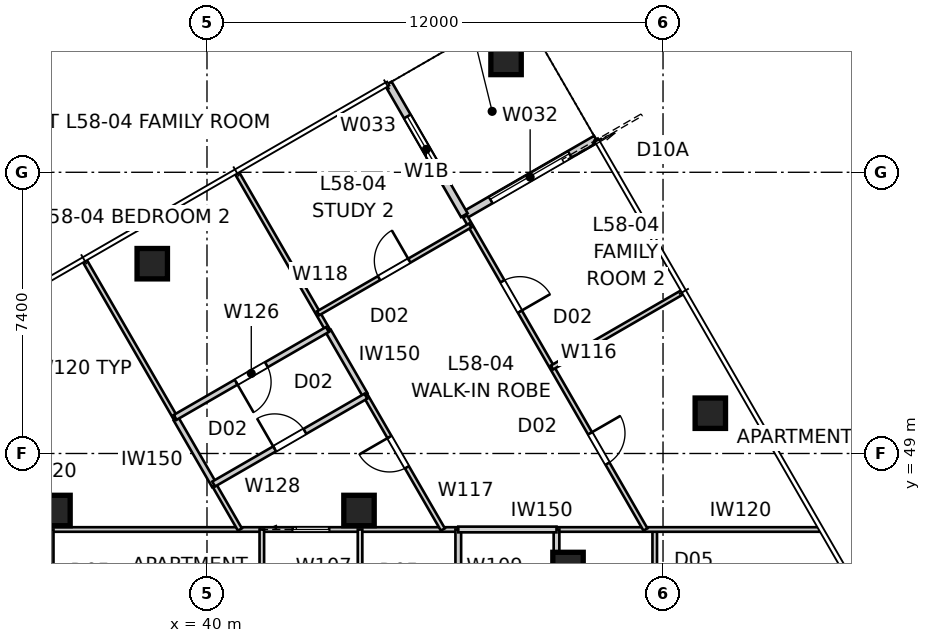
"""IFC4 building model, lengths in metres.
Left out: names, types, materials, properties, quantities, classifications, styles, units other than length and angle.
Written with IfcOpenShell. Run it as: python <this file> out.ifc"""

import sys

from ifc_helpers import new_model, si_unit, direction, frame, frame_2d, origin, origin_2d, place, context, subcontext, project, spatial, rectangle, extrude, element, fill, save


model = new_model("IFC4")
c1 = context("Model", 3, precision=1e-05, world=origin(), true_north=direction((0.0, 1.0)))
c2 = subcontext(c1, "Body", "Model", "MODEL_VIEW")
j1 = project(units=[si_unit("LENGTHUNIT", "METRE"), si_unit("PLANEANGLEUNIT", "RADIAN")], contexts=[c1])
p1 = place(None, origin())
s1 = spatial("IfcSite", under=j1, at=p1, CompositionType="ELEMENT")
p2 = place(p1, origin())
s2 = spatial("IfcBuilding", under=s1, at=p2, CompositionType="ELEMENT")
p3 = place(p2, frame((0.0, 0.0, 211.6)))
s3 = spatial("IfcBuildingStorey", under=s2, at=p3, CompositionType="ELEMENT", Elevation=211.6)
for number, where, z_axis, x_axis in (
    (1, (53.245, 50.06, 0.0), (0.0, 0.0, 1.0), (1.0, 0.0, 0.0)),
    (2, (47.87, 59.37, 0.0), (0.0, 0.0, 1.0), (1.0, 0.0, 0.0)),
    (3, (38.56, 53.995, 0.0), (0.0, 0.0, 1.0), (1.0, 0.0, 0.0)),
    (4, (49.5, 46.0, 0.0), (0.0, 0.0, 1.0), (1.0, 0.0, 0.0)),
    (5, (44.0, 47.5, 0.0), (0.0, 0.0, 1.0), (1.0, 0.0, 0.0)),
    (6, (36.0, 47.5, 0.0), (0.0, 0.0, 1.0), (1.0, 0.0, 0.0)),
):
    element("IfcColumn", number, at=place(p3, frame(where, z_axis=z_axis, x_axis=x_axis)), inside=s3, PredefinedType="COLUMN", context=c2, shape_type="SweptSolid", body=[
        extrude(rectangle(XDim=0.8, YDim=0.8, at=origin_2d()), origin(), (0.0, 0.0, 1.0), 3.4),
    ])
p4 = place(p3, frame((50.236, 57.271, 0.0), z_axis=(0.0, 0.0, 1.0), x_axis=(-0.866026010844, -0.49999894854, 0.0)))
e7 = element("IfcWall", 7, at=p4, inside=s3, PredefinedType="SOLIDWALL", context=c2, shape_type="SweptSolid", body=[
    extrude(rectangle(XDim=4.0, YDim=0.2, at=frame_2d((2.0, 0.0))), origin(), (0.0, 0.0, 1.0), 3.25),
])
p5 = place(p4, frame((0.8, 0.0, 0.0)))
e8 = element("IfcOpeningElement", 8, at=p5, cuts=e7, PredefinedType="OPENING", context=c2, shape_type="SweptSolid", body=[
    extrude(rectangle(XDim=2.4, YDim=2.1, at=frame_2d((1.2, 1.05))), frame((0.0, 0.11, 0.0), z_axis=(0.0, -1.0, 0.0), x_axis=(1.0, 0.0, 0.0)), (0.0, 0.0, 1.0), 0.22),
])
p6 = place(p3, frame((46.771, 55.271, 0.0), z_axis=(0.0, 0.0, 1.0), x_axis=(-0.49999894854, 0.866026010844, 0.0)))
e9 = element("IfcWall", 9, at=p6, inside=s3, PredefinedType="SOLIDWALL", context=c2, shape_type="SweptSolid", body=[
    extrude(rectangle(XDim=4.0, YDim=0.2, at=frame_2d((2.0, 0.0))), origin(), (0.0, 0.0, 1.0), 3.25),
])
p7 = place(p6, frame((1.0, 0.0, 0.45)))
e10 = element("IfcOpeningElement", 10, at=p7, cuts=e9, PredefinedType="OPENING", context=c2, shape_type="SweptSolid", body=[
    extrude(rectangle(XDim=2.0, YDim=1.8, at=frame_2d((1.0, 0.9))), frame((0.0, 0.11, 0.0), z_axis=(0.0, -1.0, 0.0), x_axis=(1.0, 0.0, 0.0)), (0.0, 0.0, 1.0), 0.22),
])
p8 = place(p3, frame((24.525, 47.0, 0.0), z_axis=(0.0, 0.0, 1.0), x_axis=(1.0, 0.0, 0.0)))
e11 = element("IfcWall", 11, at=p8, inside=s3, PredefinedType="PARTITIONING", context=c2, shape_type="SweptSolid", body=[
    extrude(rectangle(XDim=22.087, YDim=0.12, at=frame_2d((11.044, 0.0))), origin(), (0.0, 0.0, 1.0), 2.55),
])
p9 = place(p8, frame((1.928, 0.0, 0.0)))
e12 = element("IfcOpeningElement", 12, at=p9, cuts=e11, PredefinedType="OPENING", context=c2, shape_type="SweptSolid", body=[
    extrude(rectangle(XDim=0.92, YDim=2.34, at=frame_2d((0.46, 1.17))), frame((0.0, 0.07, 0.0), z_axis=(0.0, -1.0, 0.0), x_axis=(1.0, 0.0, 0.0)), (0.0, 0.0, 1.0), 0.14),
])
p10 = place(p8, frame((17.73, 0.0, 0.0)))
e13 = element("IfcOpeningElement", 13, at=p10, cuts=e11, PredefinedType="OPENING", context=c2, shape_type="SweptSolid", body=[
    extrude(rectangle(XDim=0.96, YDim=2.1, at=frame_2d((0.48, 1.05))), frame((0.0, 0.07, 0.0), z_axis=(0.0, -1.0, 0.0), x_axis=(1.0, 0.0, 0.0)), (0.0, 0.0, 1.0), 0.14),
])
p11 = place(p3, frame((35.901, 47.0, 0.0), z_axis=(0.0, 0.0, 1.0), x_axis=(0.0, -1.0, 0.0)))
e14 = element("IfcWall", 14, at=p11, inside=s3, PredefinedType="PARTITIONING", context=c2, shape_type="SweptSolid", body=[
    extrude(rectangle(XDim=4.9, YDim=0.12, at=frame_2d((2.45, 0.0))), origin(), (0.0, 0.0, 1.0), 3.25),
])
p12 = place(p11, frame((1.97, 0.0, 0.0)))
e15 = element("IfcOpeningElement", 15, at=p12, cuts=e14, PredefinedType="OPENING", context=c2, shape_type="SweptSolid", body=[
    extrude(rectangle(XDim=0.96, YDim=2.1, at=frame_2d((0.48, 1.05))), frame((0.0, 0.07, 0.0), z_axis=(0.0, -1.0, 0.0), x_axis=(1.0, 0.0, 0.0)), (0.0, 0.0, 1.0), 0.14),
])
p13 = place(p3, frame((51.782, 41.18, 0.0), z_axis=(0.0, 0.0, 1.0), x_axis=(0.0, 1.0, 0.0)))
e16 = element("IfcWall", 16, at=p13, inside=s3, PredefinedType="PARTITIONING", context=c2, shape_type="SweptSolid", body=[
    extrude(rectangle(XDim=5.82, YDim=0.12, at=frame_2d((2.91, 0.0))), origin(), (0.0, 0.0, 1.0), 3.25),
])
p14 = place(p13, frame((3.178, 0.0, 0.0)))
e17 = element("IfcOpeningElement", 17, at=p14, cuts=e16, PredefinedType="OPENING", context=c2, shape_type="SweptSolid", body=[
    extrude(rectangle(XDim=0.96, YDim=2.1, at=frame_2d((0.48, 1.05))), frame((0.0, 0.07, 0.0), z_axis=(0.0, -1.0, 0.0), x_axis=(1.0, 0.0, 0.0)), (0.0, 0.0, 1.0), 0.14),
])
p15 = place(p3, frame((49.197, 47.0, 0.0), z_axis=(0.0, 0.0, 1.0), x_axis=(1.0, 0.0, 0.0)))
e18 = element("IfcWall", 18, at=p15, inside=s3, PredefinedType="PARTITIONING", context=c2, shape_type="SweptSolid", body=[
    extrude(rectangle(XDim=6.923, YDim=0.12, at=frame_2d((3.461, 0.0))), origin(), (0.0, 0.0, 1.0), 3.25),
])
p16 = place(p3, frame((44.028, 47.0, 0.0), z_axis=(0.0, 0.0, 1.0), x_axis=(0.0, -1.0, 0.0)))
e19 = element("IfcWall", 19, at=p16, inside=s3, PredefinedType="PARTITIONING", context=c2, shape_type="SweptSolid", body=[
    extrude(rectangle(XDim=4.9, YDim=0.12, at=frame_2d((2.45, 0.0))), origin(), (0.0, 0.0, 1.0), 3.25),
])
p17 = place(p16, frame((1.97, 0.0, 0.0)))
e20 = element("IfcOpeningElement", 20, at=p17, cuts=e19, PredefinedType="OPENING", context=c2, shape_type="SweptSolid", body=[
    extrude(rectangle(XDim=0.96, YDim=2.1, at=frame_2d((0.48, 1.05))), frame((0.0, 0.07, 0.0), z_axis=(0.0, -1.0, 0.0), x_axis=(1.0, 0.0, 0.0)), (0.0, 0.0, 1.0), 0.14),
])
p18 = place(p3, frame((41.443, 42.1, 0.0), z_axis=(0.0, 0.0, 1.0), x_axis=(0.0, 1.0, 0.0)))
e21 = element("IfcWall", 21, at=p18, inside=s3, PredefinedType="PARTITIONING", context=c2, shape_type="SweptSolid", body=[
    extrude(rectangle(XDim=4.9, YDim=0.12, at=frame_2d((2.45, 0.0))), origin(), (0.0, 0.0, 1.0), 3.25),
])
p19 = place(p18, frame((1.97, 0.0, 0.0)))
e22 = element("IfcOpeningElement", 22, at=p19, cuts=e21, PredefinedType="OPENING", context=c2, shape_type="SweptSolid", body=[
    extrude(rectangle(XDim=0.96, YDim=2.1, at=frame_2d((0.48, 1.05))), frame((0.0, 0.07, 0.0), z_axis=(0.0, -1.0, 0.0), x_axis=(1.0, 0.0, 0.0)), (0.0, 0.0, 1.0), 0.14),
])
p20 = place(p3, frame((46.612, 47.0, 0.0), z_axis=(0.0, 0.0, 1.0), x_axis=(0.0, -1.0, 0.0)))
e23 = element("IfcWall", 23, at=p20, inside=s3, PredefinedType="SOLIDWALL", context=c2, shape_type="SweptSolid", body=[
    extrude(rectangle(XDim=4.9, YDim=0.15, at=frame_2d((2.45, 0.0))), origin(), (0.0, 0.0, 1.0), 3.25),
])
p21 = place(p20, frame((1.99, 0.0, 0.0)))
e24 = element("IfcOpeningElement", 24, at=p21, cuts=e23, PredefinedType="OPENING", context=c2, shape_type="SweptSolid", body=[
    extrude(rectangle(XDim=0.92, YDim=2.34, at=frame_2d((0.46, 1.17))), frame((0.0, 0.085, 0.0), z_axis=(0.0, -1.0, 0.0), x_axis=(1.0, 0.0, 0.0)), (0.0, 0.0, 1.0), 0.17),
])
p22 = place(p3, frame((49.197, 42.1, 0.0), z_axis=(0.0, 0.0, 1.0), x_axis=(0.0, 1.0, 0.0)))
e25 = element("IfcWall", 25, at=p22, inside=s3, PredefinedType="SOLIDWALL", context=c2, shape_type="SweptSolid", body=[
    extrude(rectangle(XDim=4.9, YDim=0.15, at=frame_2d((2.45, 0.0))), origin(), (0.0, 0.0, 1.0), 3.25),
])
p23 = place(p22, frame((1.97, 0.0, 0.0)))
e26 = element("IfcOpeningElement", 26, at=p23, cuts=e25, PredefinedType="OPENING", context=c2, shape_type="SweptSolid", body=[
    extrude(rectangle(XDim=0.96, YDim=2.1, at=frame_2d((0.48, 1.05))), frame((0.0, 0.085, 0.0), z_axis=(0.0, -1.0, 0.0), x_axis=(1.0, 0.0, 0.0)), (0.0, 0.0, 1.0), 0.17),
])
p24 = place(p3, frame((46.612, 47.0, 0.0), z_axis=(0.0, 0.0, 1.0), x_axis=(1.0, 0.0, 0.0)))
e27 = element("IfcWall", 27, at=p24, inside=s3, PredefinedType="SOLIDWALL", context=c2, shape_type="SweptSolid", body=[
    extrude(rectangle(XDim=2.585, YDim=0.15, at=frame_2d((1.292, 0.0))), origin(), (0.0, 0.0, 1.0), 3.25),
])
p25 = place(p3, frame((43.193, 52.219, 0.0), z_axis=(0.0, 0.0, 1.0), x_axis=(-0.50000634465, 0.866021740668, 0.0)))
e28 = element("IfcWall", 28, at=p25, inside=s3, PredefinedType="PARTITIONING", context=c2, shape_type="SweptSolid", body=[
    extrude(rectangle(XDim=4.814, YDim=0.12, at=frame_2d((2.407, 0.0))), origin(), (0.0, 0.0, 1.0), 3.25),
])
p26 = place(p3, frame((46.792, 55.237, 0.0), z_axis=(0.0, 0.0, 1.0), x_axis=(0.49923620881, -0.866465929978, 0.0)))
e29 = element("IfcWall", 29, at=p26, inside=s3, PredefinedType="PARTITIONING", context=c2, shape_type="SweptSolid", body=[
    extrude(rectangle(XDim=9.506, YDim=0.12, at=frame_2d((4.753, 0.0))), origin(), (0.0, 0.0, 1.0), 3.25),
])
p27 = place(p26, frame((6.586, 0.0, 0.0)))
e30 = element("IfcOpeningElement", 30, at=p27, cuts=e29, PredefinedType="OPENING", context=c2, shape_type="SweptSolid", body=[
    extrude(rectangle(XDim=0.92, YDim=2.34, at=frame_2d((0.46, 1.17))), frame((0.0, 0.07, 0.0), z_axis=(0.0, -1.0, 0.0), x_axis=(1.0, 0.0, 0.0)), (0.0, 0.0, 1.0), 0.14),
])
p28 = place(p26, frame((1.969, 0.0, 0.0)))
e31 = element("IfcOpeningElement", 31, at=p28, cuts=e29, PredefinedType="OPENING", context=c2, shape_type="SweptSolid", body=[
    extrude(rectangle(XDim=0.92, YDim=2.34, at=frame_2d((0.46, 1.17))), frame((0.0, 0.07, 0.0), z_axis=(0.0, -1.0, 0.0), x_axis=(1.0, 0.0, 0.0)), (0.0, 0.0, 1.0), 0.14),
])
p29 = place(p3, frame((46.207, 47.0, 0.0), z_axis=(0.0, 0.0, 1.0), x_axis=(-0.499986975689, 0.866032923243, 0.0)))
e32 = element("IfcWall", 32, at=p29, inside=s3, PredefinedType="PARTITIONING", context=c2, shape_type="SweptSolid", body=[
    extrude(rectangle(XDim=4.101, YDim=0.12, at=frame_2d((2.051, 0.0))), origin(), (0.0, 0.0, 1.0), 3.25),
])
p30 = place(p29, frame((1.891, 0.0, 0.0)))
e33 = element("IfcOpeningElement", 33, at=p30, cuts=e32, PredefinedType="OPENING", context=c2, shape_type="SweptSolid", body=[
    extrude(rectangle(XDim=0.92, YDim=2.34, at=frame_2d((0.46, 1.17))), frame((0.0, 0.07, 0.0), z_axis=(0.0, -1.0, 0.0), x_axis=(1.0, 0.0, 0.0)), (0.0, 0.0, 1.0), 0.14),
])
p31 = place(p3, frame((42.922, 52.688, 0.0), z_axis=(0.0, 0.0, 1.0), x_axis=(0.866025598446, 0.499999662836, 0.0)))
e34 = element("IfcWall", 34, at=p31, inside=s3, PredefinedType="PARTITIONING", context=c2, shape_type="SweptSolid", body=[
    extrude(rectangle(XDim=4.625, YDim=0.12, at=frame_2d((2.312, 0.0))), origin(), (0.0, 0.0, 1.0), 3.25),
])
p32 = place(p31, frame((1.853, 0.0, 0.0)))
e35 = element("IfcOpeningElement", 35, at=p32, cuts=e34, PredefinedType="OPENING", context=c2, shape_type="SweptSolid", body=[
    extrude(rectangle(XDim=0.92, YDim=2.34, at=frame_2d((0.46, 1.17))), frame((0.0, 0.07, 0.0), z_axis=(0.0, -1.0, 0.0), x_axis=(1.0, 0.0, 0.0)), (0.0, 0.0, 1.0), 0.14),
])
p33 = place(p3, frame((44.156, 50.552, 0.0), z_axis=(0.0, 0.0, 1.0), x_axis=(-0.50001143954, 0.866018799062, 0.0)))
e36 = element("IfcWall", 36, at=p33, inside=s3, PredefinedType="SOLIDWALL", context=c2, shape_type="SweptSolid", body=[
    extrude(rectangle(XDim=1.926, YDim=0.15, at=frame_2d((0.963, 0.0))), origin(), (0.0, 0.0, 1.0), 3.25),
])
p34 = place(p3, frame((36.781, 54.076, 0.0), z_axis=(0.0, 0.0, 1.0), x_axis=(0.50000634465, -0.866021740668, 0.0)))
e37 = element("IfcWall", 37, at=p34, inside=s3, PredefinedType="PARTITIONING", context=c2, shape_type="SweptSolid", body=[
    extrude(rectangle(XDim=4.814, YDim=0.12, at=frame_2d((2.407, 0.0))), origin(), (0.0, 0.0, 1.0), 3.25),
])
p35 = place(p3, frame((40.2, 48.153, 0.0), z_axis=(0.0, 0.0, 1.0), x_axis=(0.500045314201, -0.865999240038, 0.0)))
e38 = element("IfcWall", 38, at=p35, inside=s3, PredefinedType="PARTITIONING", context=c2, shape_type="SweptSolid", body=[
    extrude(rectangle(XDim=1.331, YDim=0.12, at=frame_2d((0.666, 0.0))), origin(), (0.0, 0.0, 1.0), 3.25),
])
p36 = place(p3, frame((39.188, 49.907, 0.0), z_axis=(0.0, 0.0, 1.0), x_axis=(0.499924156672, -0.866069187523, 0.0)))
e39 = element("IfcWall", 39, at=p36, inside=s3, PredefinedType="SOLIDWALL", context=c2, shape_type="SweptSolid", body=[
    extrude(rectangle(XDim=2.026, YDim=0.15, at=frame_2d((1.013, 0.0))), origin(), (0.0, 0.0, 1.0), 3.25),
])
p37 = place(p3, frame((43.168, 52.263, 0.0), z_axis=(0.0, 0.0, 1.0), x_axis=(-0.866025598446, -0.499999662836, 0.0)))
e40 = element("IfcWall", 40, at=p37, inside=s3, PredefinedType="SOLIDWALL", context=c2, shape_type="SweptSolid", body=[
    extrude(rectangle(XDim=4.625, YDim=0.15, at=frame_2d((2.312, 0.0))), origin(), (0.0, 0.0, 1.0), 3.25),
])
p38 = place(p37, frame((1.853, 0.0, 0.0)))
e41 = element("IfcOpeningElement", 41, at=p38, cuts=e40, PredefinedType="OPENING", context=c2, shape_type="SweptSolid", body=[
    extrude(rectangle(XDim=0.92, YDim=2.34, at=frame_2d((0.46, 1.17))), frame((0.0, 0.085, 0.0), z_axis=(0.0, -1.0, 0.0), x_axis=(1.0, 0.0, 0.0)), (0.0, 0.0, 1.0), 0.17),
])
p39 = place(p3, frame((49.077, 51.262, 0.0), z_axis=(0.0, 0.0, 1.0), x_axis=(0.865992964694, 0.500056181943, 0.0)))
e42 = element("IfcWall", 42, at=p39, inside=s3, PredefinedType="PARTITIONING", context=c2, shape_type="SweptSolid", body=[
    extrude(rectangle(XDim=3.968, YDim=0.12, at=frame_2d((1.984, 0.0))), origin(), (0.0, 0.0, 1.0), 3.25),
])
p40 = place(p3, frame((40.176, 48.196, 0.0), z_axis=(0.0, 0.0, 1.0), x_axis=(0.866025598446, 0.499999662836, 0.0)))
e43 = element("IfcWall", 43, at=p40, inside=s3, PredefinedType="SOLIDWALL", context=c2, shape_type="SweptSolid", body=[
    extrude(rectangle(XDim=4.625, YDim=0.15, at=frame_2d((2.312, 0.0))), origin(), (0.0, 0.0, 1.0), 3.25),
])
p41 = place(p40, frame((1.853, 0.0, 0.0)))
e44 = element("IfcOpeningElement", 44, at=p41, cuts=e43, PredefinedType="OPENING", context=c2, shape_type="SweptSolid", body=[
    extrude(rectangle(XDim=0.92, YDim=2.34, at=frame_2d((0.46, 1.17))), frame((0.0, 0.085, 0.0), z_axis=(0.0, -1.0, 0.0), x_axis=(1.0, 0.0, 0.0)), (0.0, 0.0, 1.0), 0.17),
])
p42 = place(p5, origin())
e45 = element("IfcDoor", 45, at=p42, inside=s3, OperationType="SLIDING_TO_LEFT", PredefinedType="DOOR", context=c2, shape_type="SweptSolid", body=[
    extrude(rectangle(XDim=2.4, YDim=2.1, at=frame_2d((1.2, 1.05))), frame((0.0, 0.025, 0.0), z_axis=(0.0, -1.0, 0.0), x_axis=(1.0, 0.0, 0.0)), (0.0, 0.0, 1.0), 0.05),
])
fill(e8, e45)
p43 = place(p7, origin())
e46 = element("IfcWindow", 46, at=p43, inside=s3, PartitioningType="SINGLE_PANEL", PredefinedType="WINDOW", context=c2, shape_type="SweptSolid", body=[
    extrude(rectangle(XDim=2.0, YDim=1.8, at=frame_2d((1.0, 0.9))), frame((0.0, 0.03, 0.0), z_axis=(0.0, -1.0, 0.0), x_axis=(1.0, 0.0, 0.0)), (0.0, 0.0, 1.0), 0.06),
])
fill(e10, e46)
p44 = place(p10, origin())
e47 = element("IfcDoor", 47, at=p44, inside=s3, OperationType="SLIDING_TO_LEFT", PredefinedType="DOOR", context=c2, shape_type="SweptSolid", body=[
    extrude(rectangle(XDim=0.96, YDim=2.1, at=frame_2d((0.48, 1.05))), frame((0.0, 0.025, 0.0), z_axis=(0.0, -1.0, 0.0), x_axis=(1.0, 0.0, 0.0)), (0.0, 0.0, 1.0), 0.05),
])
fill(e13, e47)
p45 = place(p41, origin())
e48 = element("IfcDoor", 48, at=p45, inside=s3, OperationType="SINGLE_SWING_LEFT", PredefinedType="DOOR", context=c2, shape_type="SweptSolid", body=[
    extrude(rectangle(XDim=0.92, YDim=2.34, at=frame_2d((0.46, 1.17))), frame((0.0, 0.025, 0.0), z_axis=(0.0, -1.0, 0.0), x_axis=(1.0, 0.0, 0.0)), (0.0, 0.0, 1.0), 0.05),
])
fill(e44, e48)
p46 = place(p30, origin())
e49 = element("IfcDoor", 49, at=p46, inside=s3, OperationType="SINGLE_SWING_RIGHT", PredefinedType="DOOR", context=c2, shape_type="SweptSolid", body=[
    extrude(rectangle(XDim=0.92, YDim=2.34, at=frame_2d((0.46, 1.17))), frame((0.0, 0.025, 0.0), z_axis=(0.0, -1.0, 0.0), x_axis=(1.0, 0.0, 0.0)), (0.0, 0.0, 1.0), 0.05),
])
fill(e33, e49)
p47 = place(p38, origin())
e50 = element("IfcDoor", 50, at=p47, inside=s3, OperationType="SINGLE_SWING_RIGHT", PredefinedType="DOOR", context=c2, shape_type="SweptSolid", body=[
    extrude(rectangle(XDim=0.92, YDim=2.34, at=frame_2d((0.46, 1.17))), frame((0.0, 0.025, 0.0), z_axis=(0.0, -1.0, 0.0), x_axis=(1.0, 0.0, 0.0)), (0.0, 0.0, 1.0), 0.05),
])
fill(e41, e50)
p48 = place(p27, origin())
e51 = element("IfcDoor", 51, at=p48, inside=s3, OperationType="SINGLE_SWING_LEFT", PredefinedType="DOOR", context=c2, shape_type="SweptSolid", body=[
    extrude(rectangle(XDim=0.92, YDim=2.34, at=frame_2d((0.46, 1.17))), frame((0.0, 0.025, 0.0), z_axis=(0.0, -1.0, 0.0), x_axis=(1.0, 0.0, 0.0)), (0.0, 0.0, 1.0), 0.05),
])
fill(e30, e51)
p49 = place(p32, origin())
e52 = element("IfcDoor", 52, at=p49, inside=s3, OperationType="SINGLE_SWING_RIGHT", PredefinedType="DOOR", context=c2, shape_type="SweptSolid", body=[
    extrude(rectangle(XDim=0.92, YDim=2.34, at=frame_2d((0.46, 1.17))), frame((0.0, 0.025, 0.0), z_axis=(0.0, -1.0, 0.0), x_axis=(1.0, 0.0, 0.0)), (0.0, 0.0, 1.0), 0.05),
])
fill(e35, e52)
p50 = place(p28, origin())
e53 = element("IfcDoor", 53, at=p50, inside=s3, OperationType="SINGLE_SWING_RIGHT", PredefinedType="DOOR", context=c2, shape_type="SweptSolid", body=[
    extrude(rectangle(XDim=0.92, YDim=2.34, at=frame_2d((0.46, 1.17))), frame((0.0, 0.025, 0.0), z_axis=(0.0, -1.0, 0.0), x_axis=(1.0, 0.0, 0.0)), (0.0, 0.0, 1.0), 0.05),
])
fill(e31, e53)
save(model, sys.argv[1])
